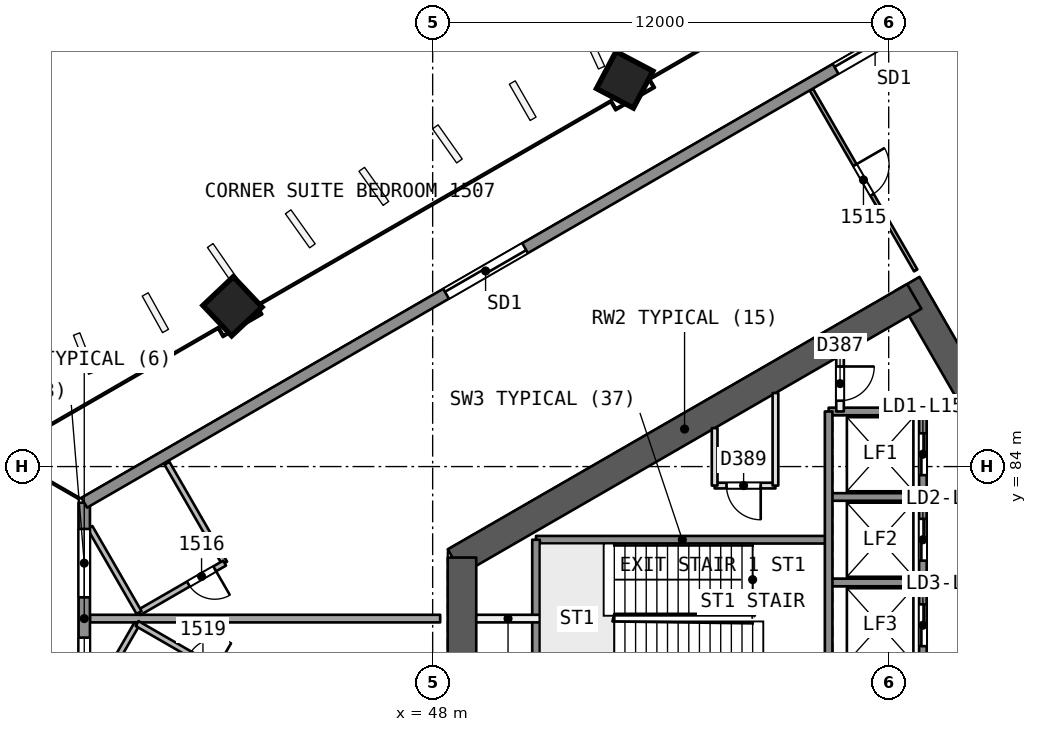
"""IFC4 building model, lengths in metres.
Left out: names, types, materials, properties, quantities, classifications, styles, units other than length and angle.
Written with IfcOpenShell. Run it as: python <this file> out.ifc"""

import sys

from ifc_helpers import new_model, si_unit, direction, frame, frame_2d, origin, origin_2d, place, context, subcontext, project, spatial, rectangle, extrude, element, fill, save


model = new_model("IFC4")
c1 = context("Model", 3, precision=1e-05, world=origin(), true_north=direction((0.0, 1.0)))
c2 = subcontext(c1, "Body", "Model", "MODEL_VIEW")
j1 = project(units=[si_unit("LENGTHUNIT", "METRE"), si_unit("PLANEANGLEUNIT", "RADIAN")], contexts=[c1])
p1 = place(None, origin())
s1 = spatial("IfcSite", under=j1, at=p1, CompositionType="ELEMENT")
p2 = place(p1, origin())
s2 = spatial("IfcBuilding", under=s1, at=p2, CompositionType="ELEMENT")
p3 = place(p2, frame((0.0, 0.0, 68.4)))
s3 = spatial("IfcBuildingStorey", under=s2, at=p3, CompositionType="ELEMENT", Elevation=68.4)
p4 = place(p3, frame((65.567, 80.0, 0.0), z_axis=(0.0, 0.0, 1.0), x_axis=(-0.499988615364, 0.866031976607, 0.0)))
e1 = element("IfcWall", 1, at=p4, inside=s3, PredefinedType="SHEAR", context=c2, shape_type="SweptSolid", body=[
    extrude(rectangle(XDim=10.163, YDim=0.75, at=frame_2d((5.082, 0.0))), origin(), (0.0, 0.0, 1.0), 3.7),
])
p5 = place(p4, frame((0.733, 0.0, 0.0)))
e2 = element("IfcOpeningElement", 2, at=p5, cuts=e1, PredefinedType="OPENING", context=c2, shape_type="SweptSolid", body=[
    extrude(rectangle(XDim=1.2, YDim=2.1, at=frame_2d((0.6, 1.05))), frame((0.0, 0.385, 0.0), z_axis=(0.0, -1.0, 0.0), x_axis=(1.0, 0.0, 0.0)), (0.0, 0.0, 1.0), 0.771),
])
p6 = place(p3, frame((60.673, 88.477, 0.0), z_axis=(0.0, 0.0, 1.0), x_axis=(-0.8660248072, -0.500001033313, 0.0)))
e3 = element("IfcWall", 3, at=p6, inside=s3, PredefinedType="SHEAR", context=c2, shape_type="SweptSolid", body=[
    extrude(rectangle(XDim=13.958, YDim=0.75, at=frame_2d((6.979, 0.0))), origin(), (0.0, 0.0, 1.0), 3.7),
])
p7 = place(p3, frame((48.772, 81.606, 0.0), z_axis=(0.0, 0.0, 1.0), x_axis=(0.0, -1.0, 0.0)))
e4 = element("IfcWall", 4, at=p7, inside=s3, PredefinedType="SHEAR", context=c2, shape_type="SweptSolid", body=[
    extrude(rectangle(XDim=3.429, YDim=0.75, at=frame_2d((1.714, 0.0))), origin(), (0.0, 0.0, 1.0), 3.7),
])
p8 = place(p3, frame((60.673, 71.523, 0.0), z_axis=(0.0, 0.0, 1.0), x_axis=(0.499997052475, 0.866027105532, 0.0)))
e5 = element("IfcWall", 5, at=p8, inside=s3, PredefinedType="SHEAR", context=c2, shape_type="SweptSolid", body=[
    extrude(rectangle(XDim=10.005, YDim=0.75, at=frame_2d((5.002, 0.0))), origin(), (0.0, 0.0, 1.0), 3.7),
])
p9 = place(p8, frame((7.855, 0.0, 0.0)))
e6 = element("IfcOpeningElement", 6, at=p9, cuts=e5, PredefinedType="OPENING", context=c2, shape_type="SweptSolid", body=[
    extrude(rectangle(XDim=1.2, YDim=2.1, at=frame_2d((0.6, 1.05))), frame((0.0, 0.385, 0.0), z_axis=(0.0, -1.0, 0.0), x_axis=(1.0, 0.0, 0.0)), (0.0, 0.0, 1.0), 0.771),
])
p10 = place(p3, frame((53.031, 94.191, 0.0), z_axis=(0.019327242333, -0.012137244332, 0.999739538582), x_axis=(-0.500205640682, 0.865671471182, 0.020179717829)))
e7 = element("IfcColumn", 7, at=p10, inside=s3, PredefinedType="COLUMN", context=c2, shape_type="SweptSolid", body=[
    extrude(rectangle(XDim=1.1, YDim=1.1, at=origin_2d()), origin(), (0.0, 0.0, 1.0), 3.701),
])
p11 = place(p3, frame((42.698, 88.226, 0.0), z_axis=(0.028557219273, -0.006859008786, 0.999568626571), x_axis=(-0.498515256127, 0.866645794777, 0.020189249707)))
e8 = element("IfcColumn", 8, at=p11, inside=s3, PredefinedType="COLUMN", context=c2, shape_type="SweptSolid", body=[
    extrude(rectangle(XDim=1.1, YDim=1.1, at=origin_2d()), origin(), (0.0, 0.0, 1.0), 3.702),
])
p12 = place(p3, frame((61.472, 95.948, 0.0), z_axis=(0.0, 0.0, 1.0), x_axis=(0.499993239154, -0.866029307125, 0.0)))
e9 = element("IfcWall", 9, at=p12, inside=s3, PredefinedType="PARTITIONING", context=c2, shape_type="SweptSolid", body=[
    extrude(rectangle(XDim=13.476, YDim=0.2, at=frame_2d((6.738, 0.0))), origin(), (0.0, 0.0, 1.0), 3.2),
])
p13 = place(p3, frame((57.962, 93.922, 0.0), z_axis=(0.0, 0.0, 1.0), x_axis=(0.499974920023, -0.866039883231, 0.0)))
e10 = element("IfcWall", 10, at=p13, inside=s3, PredefinedType="PARTITIONING", context=c2, shape_type="SweptSolid", body=[
    extrude(rectangle(XDim=5.497, YDim=0.1, at=frame_2d((2.749, 0.0))), origin(), (0.0, 0.0, 1.0), 3.2),
])
p14 = place(p13, frame((2.298, 0.0, 0.0)))
e11 = element("IfcOpeningElement", 11, at=p14, cuts=e10, PredefinedType="OPENING", context=c2, shape_type="SweptSolid", body=[
    extrude(rectangle(XDim=0.9, YDim=2.1, at=frame_2d((0.45, 1.05))), frame((0.0, 0.061, 0.0), z_axis=(0.0, -1.0, 0.0), x_axis=(1.0, 0.0, 0.0)), (0.0, 0.0, 1.0), 0.121),
])
p15 = place(p3, frame((41.009, 84.086, 0.0), z_axis=(0.0, 0.0, 1.0), x_axis=(0.500017413604, -0.866015349802, 0.0)))
e12 = element("IfcWall", 12, at=p15, inside=s3, PredefinedType="PARTITIONING", context=c2, shape_type="SweptSolid", body=[
    extrude(rectangle(XDim=3.033, YDim=0.15, at=frame_2d((1.517, 0.0))), origin(), (0.0, 0.0, 1.0), 3.2),
])
p16 = place(p3, frame((42.525, 81.46, 0.0), z_axis=(0.0, 0.0, 1.0), x_axis=(-0.866021400173, -0.500006934395, 0.0)))
e13 = element("IfcWall", 13, at=p16, inside=s3, PredefinedType="PARTITIONING", context=c2, shape_type="SweptSolid", body=[
    extrude(rectangle(XDim=2.6, YDim=0.15, at=frame_2d((1.3, 0.0))), origin(), (0.0, 0.0, 1.0), 3.2),
])
p17 = place(p16, frame((0.3, 0.0, 0.0)))
e14 = element("IfcOpeningElement", 14, at=p17, cuts=e13, PredefinedType="OPENING", context=c2, shape_type="SweptSolid", body=[
    extrude(rectangle(XDim=0.8, YDim=2.1, at=frame_2d((0.4, 1.05))), frame((0.0, 0.085, 0.0), z_axis=(0.0, -1.0, 0.0), x_axis=(1.0, 0.0, 0.0)), (0.0, 0.0, 1.0), 0.171),
])
p18 = place(p3, frame((40.273, 80.16, 0.0), z_axis=(0.0, 0.0, 1.0), x_axis=(-0.499978610854, 0.866037752461, 0.0)))
e15 = element("IfcWall", 15, at=p18, inside=s3, PredefinedType="PARTITIONING", context=c2, shape_type="SweptSolid", body=[
    extrude(rectangle(XDim=2.585, YDim=0.15, at=frame_2d((1.292, 0.0))), origin(), (0.0, 0.0, 1.0), 3.2),
])
p19 = place(p3, frame((38.981, 80.0, 0.0), z_axis=(0.0, 0.0, 1.0), x_axis=(1.0, 0.0, 0.0)))
e16 = element("IfcWall", 16, at=p19, inside=s3, PredefinedType="PARTITIONING", context=c2, shape_type="SweptSolid", body=[
    extrude(rectangle(XDim=9.217, YDim=0.2, at=frame_2d((4.608, 0.0))), origin(), (0.0, 0.0, 1.0), 3.2),
])
p20 = place(p3, frame((38.981, 77.718, 0.0), z_axis=(0.0, 0.0, 1.0), x_axis=(0.499986149909, 0.86603339999, 0.0)))
e17 = element("IfcWall", 17, at=p20, inside=s3, PredefinedType="PARTITIONING", context=c2, shape_type="SweptSolid", body=[
    extrude(rectangle(XDim=2.484, YDim=0.15, at=frame_2d((1.242, 0.0))), origin(), (0.0, 0.0, 1.0), 3.2),
])
p21 = place(p3, frame((40.223, 79.869, 0.0), z_axis=(0.0, 0.0, 1.0), x_axis=(0.866021400173, -0.500006934395, 0.0)))
e18 = element("IfcWall", 18, at=p21, inside=s3, PredefinedType="PARTITIONING", context=c2, shape_type="SweptSolid", body=[
    extrude(rectangle(XDim=2.6, YDim=0.15, at=frame_2d((1.3, 0.0))), origin(), (0.0, 0.0, 1.0), 3.2),
])
p22 = place(p21, frame((1.6, 0.0, 0.0)))
e19 = element("IfcOpeningElement", 19, at=p22, cuts=e18, PredefinedType="OPENING", context=c2, shape_type="SweptSolid", body=[
    extrude(rectangle(XDim=0.8, YDim=2.1, at=frame_2d((0.4, 1.05))), frame((0.0, 0.085, 0.0), z_axis=(0.0, -1.0, 0.0), x_axis=(1.0, 0.0, 0.0)), (0.0, 0.0, 1.0), 0.171),
])
p23 = place(p3, frame((38.832, 76.951, 0.0), z_axis=(0.0, 0.0, 1.0), x_axis=(0.0, 1.0, 0.0)))
e20 = element("IfcWall", 20, at=p23, inside=s3, PredefinedType="SOLIDWALL", context=c2, shape_type="SweptSolid", body=[
    extrude(rectangle(XDim=6.098, YDim=0.3, at=frame_2d((3.049, 0.0))), origin(), (0.0, 0.0, 1.0), 3.2),
])
p24 = place(p23, frame((3.608, 0.0, 0.9)))
e21 = element("IfcOpeningElement", 21, at=p24, cuts=e20, PredefinedType="OPENING", context=c2, shape_type="SweptSolid", body=[
    extrude(rectangle(XDim=1.8, YDim=1.5, at=frame_2d((0.9, 0.75))), frame((0.0, 0.161, 0.0), z_axis=(0.0, -1.0, 0.0), x_axis=(1.0, 0.0, 0.0)), (0.0, 0.0, 1.0), 0.321),
])
p25 = place(p23, frame((0.749, 0.0, 0.9)))
e22 = element("IfcOpeningElement", 22, at=p25, cuts=e20, PredefinedType="OPENING", context=c2, shape_type="SweptSolid", body=[
    extrude(rectangle(XDim=1.8, YDim=1.5, at=frame_2d((0.9, 0.75))), frame((0.0, 0.161, 0.0), z_axis=(0.0, -1.0, 0.0), x_axis=(1.0, 0.0, 0.0)), (0.0, 0.0, 1.0), 0.321),
])
p26 = place(p3, frame((38.832, 83.049, 0.0), z_axis=(0.0, 0.0, 1.0), x_axis=(0.866024382485, 0.500001768939, 0.0)))
e23 = element("IfcWall", 23, at=p26, inside=s3, PredefinedType="SOLIDWALL", context=c2, shape_type="SweptSolid", body=[
    extrude(rectangle(XDim=59.596, YDim=0.3, at=frame_2d((29.798, 0.0))), origin(), (0.0, 0.0, 1.0), 3.2),
])
p27 = place(p26, frame((27.507, 0.0, 0.0)))
e24 = element("IfcOpeningElement", 24, at=p27, cuts=e23, PredefinedType="OPENING", context=c2, shape_type="SweptSolid", body=[
    extrude(rectangle(XDim=2.4, YDim=2.4, at=frame_2d((1.2, 1.2))), frame((0.0, 0.161, 0.0), z_axis=(0.0, -1.0, 0.0), x_axis=(1.0, 0.0, 0.0)), (0.0, 0.0, 1.0), 0.321),
])
p28 = place(p26, frame((22.83, 0.0, 0.0)))
e25 = element("IfcOpeningElement", 25, at=p28, cuts=e23, PredefinedType="OPENING", context=c2, shape_type="SweptSolid", body=[
    extrude(rectangle(XDim=2.4, YDim=2.4, at=frame_2d((1.2, 1.2))), frame((0.0, 0.161, 0.0), z_axis=(0.0, -1.0, 0.0), x_axis=(1.0, 0.0, 0.0)), (0.0, 0.0, 1.0), 0.321),
])
p29 = place(p26, frame((10.995, 0.0, 0.0)))
e26 = element("IfcOpeningElement", 26, at=p29, cuts=e23, PredefinedType="OPENING", context=c2, shape_type="SweptSolid", body=[
    extrude(rectangle(XDim=2.4, YDim=2.4, at=frame_2d((1.2, 1.2))), frame((0.0, 0.161, 0.0), z_axis=(0.0, -1.0, 0.0), x_axis=(1.0, 0.0, 0.0)), (0.0, 0.0, 1.0), 0.321),
])
p30 = place(p26, frame((44.32, 0.0, 0.0)))
e27 = element("IfcOpeningElement", 27, at=p30, cuts=e23, PredefinedType="OPENING", context=c2, shape_type="SweptSolid", body=[
    extrude(rectangle(XDim=2.4, YDim=2.4, at=frame_2d((1.2, 1.2))), frame((0.0, 0.161, 0.0), z_axis=(0.0, -1.0, 0.0), x_axis=(1.0, 0.0, 0.0)), (0.0, 0.0, 1.0), 0.321),
])
p31 = place(p3, frame((60.9, 85.45, 0.0), z_axis=(0.0, 0.0, 1.0), x_axis=(-1.0, 0.0, 0.0)))
e28 = element("IfcWall", 28, at=p31, inside=s3, PredefinedType="SOLIDWALL", context=c2, shape_type="SweptSolid", body=[
    extrude(rectangle(XDim=2.48, YDim=0.2, at=frame_2d((1.24, 0.0))), origin(), (0.0, 0.0, 1.0), 3.2),
])
p32 = place(p3, frame((57.02, 83.5, 0.0), z_axis=(0.0, 0.0, 1.0), x_axis=(-1.0, 0.0, 0.0)))
e29 = element("IfcWall", 29, at=p32, inside=s3, PredefinedType="PARTITIONING", context=c2, shape_type="SweptSolid", body=[
    extrude(rectangle(XDim=1.6, YDim=0.15, at=frame_2d((0.8, 0.0))), origin(), (0.0, 0.0, 1.0), 3.2),
])
p33 = place(p32, frame((0.387, 0.0, 0.0)))
e30 = element("IfcOpeningElement", 30, at=p33, cuts=e29, PredefinedType="OPENING", context=c2, shape_type="SweptSolid", body=[
    extrude(rectangle(XDim=0.9, YDim=2.1, at=frame_2d((0.45, 1.05))), frame((0.0, 0.085, 0.0), z_axis=(0.0, -1.0, 0.0), x_axis=(1.0, 0.0, 0.0)), (0.0, 0.0, 1.0), 0.171),
])
p34 = place(p3, frame((60.9, 83.2, 0.0), z_axis=(0.0, 0.0, 1.0), x_axis=(-1.0, 0.0, 0.0)))
e31 = element("IfcWall", 31, at=p34, inside=s3, PredefinedType="SOLIDWALL", context=c2, shape_type="SweptSolid", body=[
    extrude(rectangle(XDim=2.48, YDim=0.2, at=frame_2d((1.24, 0.0))), origin(), (0.0, 0.0, 1.0), 3.2),
])
p35 = place(p3, frame((58.42, 82.075, 0.0), z_axis=(0.0, 0.0, 1.0), x_axis=(-1.0, 0.0, 0.0)))
e32 = element("IfcWall", 32, at=p35, inside=s3, PredefinedType="SOLIDWALL", context=c2, shape_type="SweptSolid", body=[
    extrude(rectangle(XDim=7.7, YDim=0.2, at=frame_2d((3.85, 0.0))), origin(), (0.0, 0.0, 1.0), 3.2),
])
p36 = place(p3, frame((60.9, 80.95, 0.0), z_axis=(0.0, 0.0, 1.0), x_axis=(-1.0, 0.0, 0.0)))
e33 = element("IfcWall", 33, at=p36, inside=s3, PredefinedType="SOLIDWALL", context=c2, shape_type="SweptSolid", body=[
    extrude(rectangle(XDim=2.48, YDim=0.2, at=frame_2d((1.24, 0.0))), origin(), (0.0, 0.0, 1.0), 3.2),
])
p37 = place(p3, frame((50.82, 80.0, 0.0), z_axis=(0.0, 0.0, 1.0), x_axis=(-1.0, 0.0, 0.0)))
e34 = element("IfcWall", 34, at=p37, inside=s3, PredefinedType="PARTITIONING", context=c2, shape_type="SweptSolid", body=[
    extrude(rectangle(XDim=1.673, YDim=0.2, at=frame_2d((0.836, 0.0))), origin(), (0.0, 0.0, 1.0), 3.2),
])
p38 = place(p3, frame((60.9, 85.45, 0.0), z_axis=(0.0, 0.0, 1.0), x_axis=(0.0, -1.0, 0.0)))
e35 = element("IfcWall", 35, at=p38, inside=s3, PredefinedType="SOLIDWALL", context=c2, shape_type="SweptSolid", body=[
    extrude(rectangle(XDim=10.9, YDim=0.2, at=frame_2d((5.45, 0.0))), origin(), (0.0, 0.0, 1.0), 3.2),
])
p39 = place(p38, frame((0.575, 0.0, 0.0)))
e36 = element("IfcOpeningElement", 36, at=p39, cuts=e35, PredefinedType="OPENING", context=c2, shape_type="SweptSolid", body=[
    extrude(rectangle(XDim=1.1, YDim=2.1, at=frame_2d((0.55, 1.05))), frame((0.0, 0.11, 0.0), z_axis=(0.0, -1.0, 0.0), x_axis=(1.0, 0.0, 0.0)), (0.0, 0.0, 1.0), 0.221),
])
p40 = place(p38, frame((2.825, 0.0, 0.0)))
e37 = element("IfcOpeningElement", 37, at=p40, cuts=e35, PredefinedType="OPENING", context=c2, shape_type="SweptSolid", body=[
    extrude(rectangle(XDim=1.1, YDim=2.1, at=frame_2d((0.55, 1.05))), frame((0.0, 0.11, 0.0), z_axis=(0.0, -1.0, 0.0), x_axis=(1.0, 0.0, 0.0)), (0.0, 0.0, 1.0), 0.221),
])
p41 = place(p38, frame((5.075, 0.0, 0.0)))
e38 = element("IfcOpeningElement", 38, at=p41, cuts=e35, PredefinedType="OPENING", context=c2, shape_type="SweptSolid", body=[
    extrude(rectangle(XDim=1.1, YDim=2.1, at=frame_2d((0.55, 1.05))), frame((0.0, 0.11, 0.0), z_axis=(0.0, -1.0, 0.0), x_axis=(1.0, 0.0, 0.0)), (0.0, 0.0, 1.0), 0.221),
])
p42 = place(p38, frame((7.325, 0.0, 0.0)))
e39 = element("IfcOpeningElement", 39, at=p42, cuts=e35, PredefinedType="OPENING", context=c2, shape_type="SweptSolid", body=[
    extrude(rectangle(XDim=1.1, YDim=2.1, at=frame_2d((0.55, 1.05))), frame((0.0, 0.11, 0.0), z_axis=(0.0, -1.0, 0.0), x_axis=(1.0, 0.0, 0.0)), (0.0, 0.0, 1.0), 0.221),
])
p43 = place(p3, frame((58.72, 86.917, 0.0), z_axis=(0.0, 0.0, 1.0), x_axis=(0.0, -1.0, 0.0)))
e40 = element("IfcWall", 40, at=p43, inside=s3, PredefinedType="PARTITIONING", context=c2, shape_type="SweptSolid", body=[
    extrude(rectangle(XDim=1.467, YDim=0.2, at=frame_2d((0.733, 0.0))), origin(), (0.0, 0.0, 1.0), 3.2),
])
p44 = place(p43, frame((0.283, 0.0, 0.0)))
e41 = element("IfcOpeningElement", 41, at=p44, cuts=e40, PredefinedType="OPENING", context=c2, shape_type="SweptSolid", body=[
    extrude(rectangle(XDim=0.9, YDim=2.1, at=frame_2d((0.45, 1.05))), frame((0.0, 0.11, 0.0), z_axis=(0.0, -1.0, 0.0), x_axis=(1.0, 0.0, 0.0)), (0.0, 0.0, 1.0), 0.221),
])
p45 = place(p3, frame((58.42, 85.45, 0.0), z_axis=(0.0, 0.0, 1.0), x_axis=(0.0, -1.0, 0.0)))
e42 = element("IfcWall", 42, at=p45, inside=s3, PredefinedType="SOLIDWALL", context=c2, shape_type="SweptSolid", body=[
    extrude(rectangle(XDim=9.0, YDim=0.2, at=frame_2d((4.5, 0.0))), origin(), (0.0, 0.0, 1.0), 3.2),
])
p46 = place(p3, frame((57.02, 85.935, 0.0), z_axis=(0.0, 0.0, 1.0), x_axis=(0.0, -1.0, 0.0)))
e43 = element("IfcWall", 43, at=p46, inside=s3, PredefinedType="PARTITIONING", context=c2, shape_type="SweptSolid", body=[
    extrude(rectangle(XDim=2.435, YDim=0.15, at=frame_2d((1.218, 0.0))), origin(), (0.0, 0.0, 1.0), 3.2),
])
p47 = place(p3, frame((55.42, 85.011, 0.0), z_axis=(0.0, 0.0, 1.0), x_axis=(0.0, -1.0, 0.0)))
e44 = element("IfcWall", 44, at=p47, inside=s3, PredefinedType="PARTITIONING", context=c2, shape_type="SweptSolid", body=[
    extrude(rectangle(XDim=1.511, YDim=0.15, at=frame_2d((0.756, 0.0))), origin(), (0.0, 0.0, 1.0), 3.2),
])
p48 = place(p3, frame((50.72, 82.075, 0.0), z_axis=(0.0, 0.0, 1.0), x_axis=(0.0, -1.0, 0.0)))
e45 = element("IfcWall", 45, at=p48, inside=s3, PredefinedType="SOLIDWALL", context=c2, shape_type="SweptSolid", body=[
    extrude(rectangle(XDim=4.15, YDim=0.2, at=frame_2d((2.075, 0.0))), origin(), (0.0, 0.0, 1.0), 3.2),
])
p49 = place(p14, origin())
e46 = element("IfcDoor", 46, at=p49, inside=s3, OperationType="SINGLE_SWING_LEFT", PredefinedType="NOTDEFINED", context=c2, shape_type="SweptSolid", body=[
    extrude(rectangle(XDim=0.9, YDim=2.1, at=frame_2d((0.45, 1.05))), frame((0.0, 0.025, 0.0), z_axis=(0.0, -1.0, 0.0), x_axis=(1.0, 0.0, 0.0)), (0.0, 0.0, 1.0), 0.05),
])
fill(e11, e46)
p50 = place(p17, origin())
e47 = element("IfcDoor", 47, at=p50, inside=s3, OperationType="SINGLE_SWING_LEFT", PredefinedType="NOTDEFINED", context=c2, shape_type="SweptSolid", body=[
    extrude(rectangle(XDim=0.8, YDim=2.1, at=frame_2d((0.4, 1.05))), frame((0.0, 0.025, 0.0), z_axis=(0.0, -1.0, 0.0), x_axis=(1.0, 0.0, 0.0)), (0.0, 0.0, 1.0), 0.05),
])
fill(e14, e47)
p51 = place(p24, origin())
e48 = element("IfcWindow", 48, at=p51, inside=s3, PartitioningType="SINGLE_PANEL", PredefinedType="WINDOW", context=c2, shape_type="SweptSolid", body=[
    extrude(rectangle(XDim=1.8, YDim=1.5, at=frame_2d((0.9, 0.75))), frame((0.0, 0.03, 0.0), z_axis=(0.0, -1.0, 0.0), x_axis=(1.0, 0.0, 0.0)), (0.0, 0.0, 1.0), 0.06),
])
fill(e21, e48)
p52 = place(p25, origin())
e49 = element("IfcWindow", 49, at=p52, inside=s3, PartitioningType="SINGLE_PANEL", PredefinedType="WINDOW", context=c2, shape_type="SweptSolid", body=[
    extrude(rectangle(XDim=1.8, YDim=1.5, at=frame_2d((0.9, 0.75))), frame((0.0, 0.03, 0.0), z_axis=(0.0, -1.0, 0.0), x_axis=(1.0, 0.0, 0.0)), (0.0, 0.0, 1.0), 0.06),
])
fill(e22, e49)
p53 = place(p28, origin())
e50 = element("IfcDoor", 50, at=p53, inside=s3, OperationType="SLIDING_TO_RIGHT", PredefinedType="NOTDEFINED", context=c2, shape_type="SweptSolid", body=[
    extrude(rectangle(XDim=2.4, YDim=2.4, at=frame_2d((1.2, 1.2))), frame((0.0, 0.025, 0.0), z_axis=(0.0, -1.0, 0.0), x_axis=(1.0, 0.0, 0.0)), (0.0, 0.0, 1.0), 0.05),
])
fill(e25, e50)
p54 = place(p29, origin())
e51 = element("IfcDoor", 51, at=p54, inside=s3, OperationType="SLIDING_TO_LEFT", PredefinedType="NOTDEFINED", context=c2, shape_type="SweptSolid", body=[
    extrude(rectangle(XDim=2.4, YDim=2.4, at=frame_2d((1.2, 1.2))), frame((0.0, 0.025, 0.0), z_axis=(0.0, -1.0, 0.0), x_axis=(1.0, 0.0, 0.0)), (0.0, 0.0, 1.0), 0.05),
])
fill(e26, e51)
p55 = place(p39, origin())
e52 = element("IfcDoor", 52, at=p55, inside=s3, OperationType="SLIDING_TO_RIGHT", PredefinedType="NOTDEFINED", context=c2, shape_type="SweptSolid", body=[
    extrude(rectangle(XDim=1.1, YDim=2.1, at=frame_2d((0.55, 1.05))), frame((0.0, 0.025, 0.0), z_axis=(0.0, -1.0, 0.0), x_axis=(1.0, 0.0, 0.0)), (0.0, 0.0, 1.0), 0.05),
])
fill(e36, e52)
p56 = place(p40, origin())
e53 = element("IfcDoor", 53, at=p56, inside=s3, OperationType="SLIDING_TO_LEFT", PredefinedType="NOTDEFINED", context=c2, shape_type="SweptSolid", body=[
    extrude(rectangle(XDim=1.1, YDim=2.1, at=frame_2d((0.55, 1.05))), frame((0.0, 0.025, 0.0), z_axis=(0.0, -1.0, 0.0), x_axis=(1.0, 0.0, 0.0)), (0.0, 0.0, 1.0), 0.05),
])
fill(e37, e53)
p57 = place(p41, origin())
e54 = element("IfcDoor", 54, at=p57, inside=s3, OperationType="SLIDING_TO_RIGHT", PredefinedType="NOTDEFINED", context=c2, shape_type="SweptSolid", body=[
    extrude(rectangle(XDim=1.1, YDim=2.1, at=frame_2d((0.55, 1.05))), frame((0.0, 0.025, 0.0), z_axis=(0.0, -1.0, 0.0), x_axis=(1.0, 0.0, 0.0)), (0.0, 0.0, 1.0), 0.05),
])
fill(e38, e54)
p58 = place(p44, origin())
e55 = element("IfcDoor", 55, at=p58, inside=s3, OperationType="SINGLE_SWING_LEFT", PredefinedType="NOTDEFINED", context=c2, shape_type="SweptSolid", body=[
    extrude(rectangle(XDim=0.9, YDim=2.1, at=frame_2d((0.45, 1.05))), frame((0.0, 0.025, 0.0), z_axis=(0.0, -1.0, 0.0), x_axis=(1.0, 0.0, 0.0)), (0.0, 0.0, 1.0), 0.05),
])
fill(e41, e55)
p59 = place(p33, origin())
e56 = element("IfcDoor", 56, at=p59, inside=s3, OperationType="SINGLE_SWING_LEFT", PredefinedType="NOTDEFINED", context=c2, shape_type="SweptSolid", body=[
    extrude(rectangle(XDim=0.9, YDim=2.1, at=frame_2d((0.45, 1.05))), frame((0.0, 0.025, 0.0), z_axis=(0.0, -1.0, 0.0), x_axis=(1.0, 0.0, 0.0)), (0.0, 0.0, 1.0), 0.05),
])
fill(e30, e56)
save(model, sys.argv[1])
